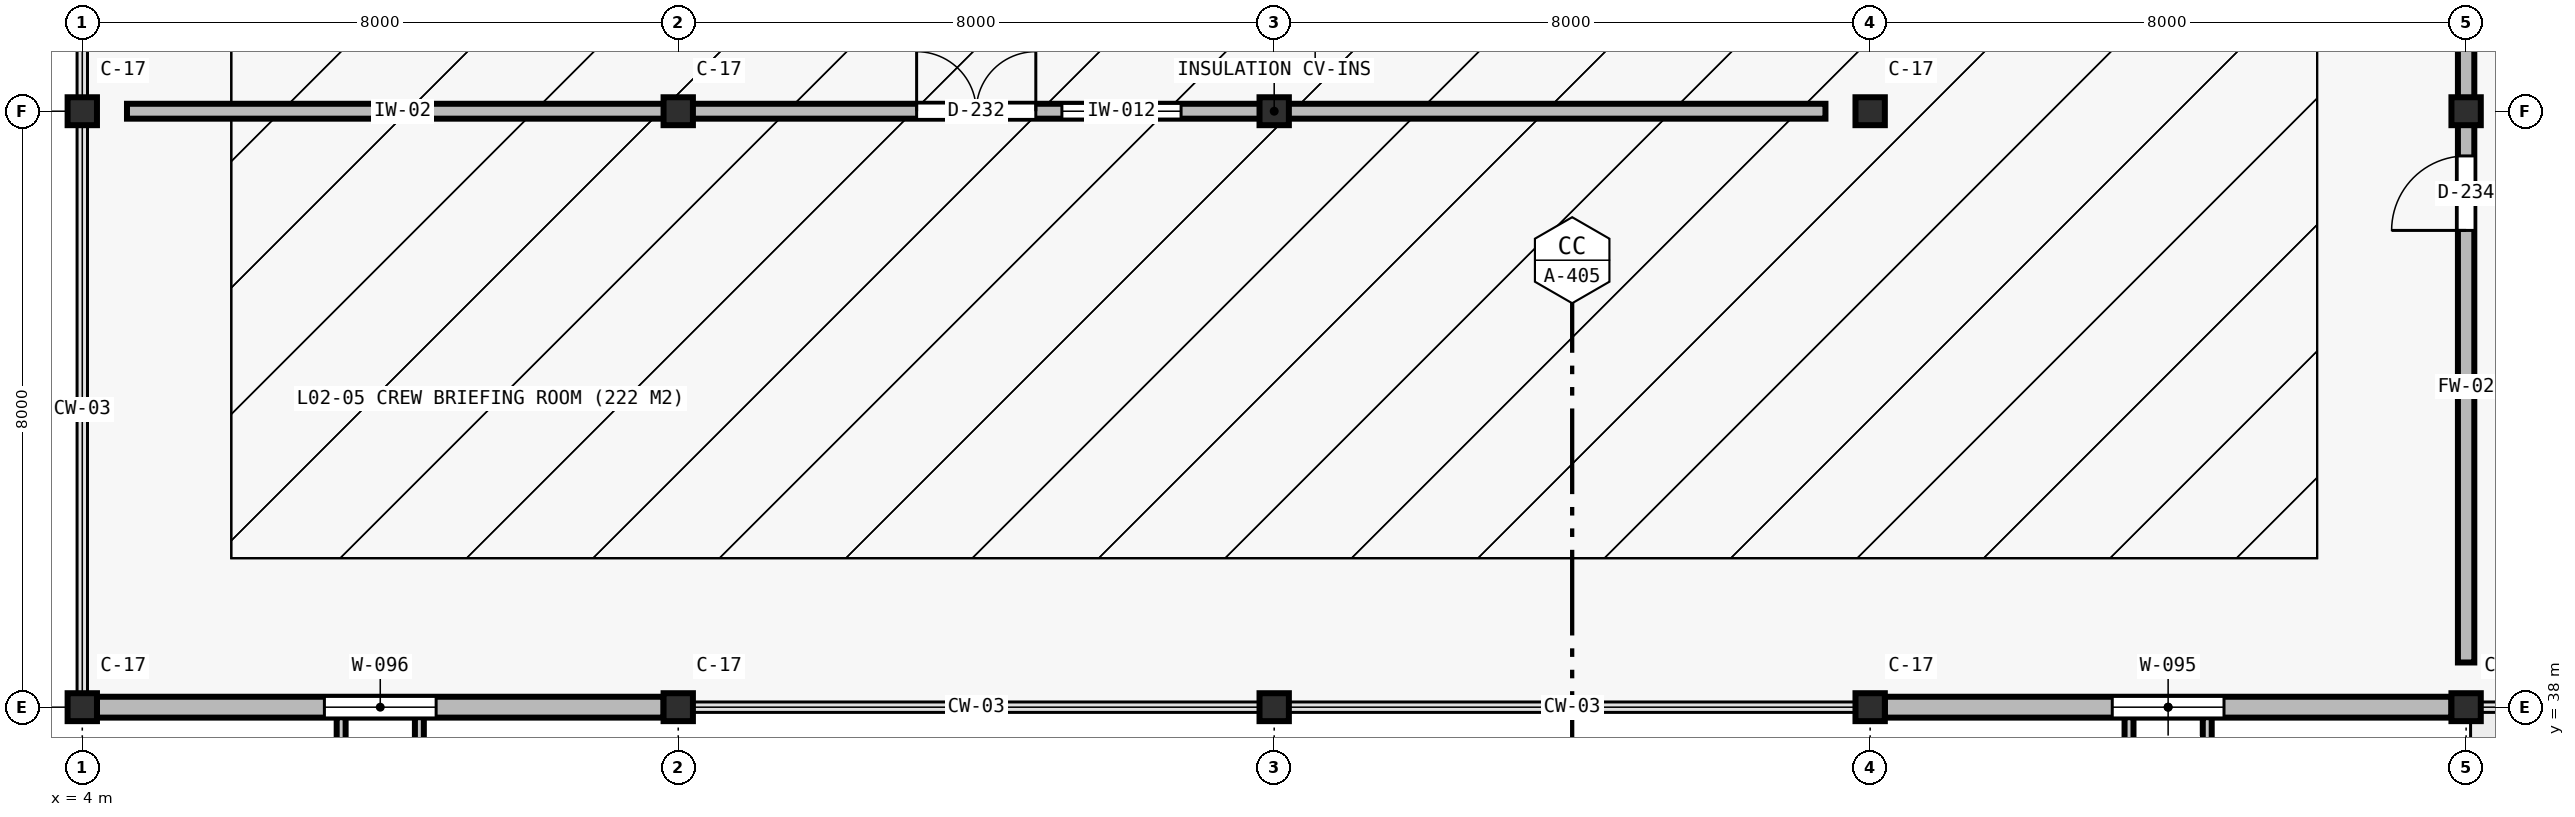
"""IFC4 building model, lengths in metres.
Left out: names, types, materials, properties, quantities, classifications, styles, units other than length and angle.
Written with IfcOpenShell. Run it as: python <this file> out.ifc"""

import sys

from ifc_helpers import new_model, si_unit, direction, frame, frame_2d, origin, origin_2d, place, context, subcontext, project, spatial, rectangle, i_section, extrude, element, fill, save


model = new_model("IFC4")
c1 = context("Model", 3, precision=1e-05, world=origin(), true_north=direction((0.0, 1.0)))
c2 = subcontext(c1, "Body", "Model", "MODEL_VIEW")
j1 = project(units=[si_unit("LENGTHUNIT", "METRE"), si_unit("PLANEANGLEUNIT", "RADIAN")], contexts=[c1])
p1 = place(None, origin())
s1 = spatial("IfcSite", under=j1, at=p1, CompositionType="ELEMENT")
p2 = place(p1, origin())
s2 = spatial("IfcBuilding", under=s1, at=p2, CompositionType="ELEMENT")
p3 = place(p2, frame((0.0, 0.0, 11.2)))
s3 = spatial("IfcBuildingStorey", under=s2, at=p3, CompositionType="ELEMENT", Elevation=11.2)
for number, where, z_axis, x_axis in (
    (1, (4.0, 38.0, 0.0), (0.0, 0.0, 1.0), (1.0, 0.0, 0.0)),
    (2, (4.0, 46.0, 0.0), (0.0, 0.0, 1.0), (1.0, 0.0, 0.0)),
    (3, (12.0, 38.0, 0.0), (0.0, 0.0, 1.0), (1.0, 0.0, 0.0)),
    (4, (12.0, 46.0, 0.0), (0.0, 0.0, 1.0), (1.0, 0.0, 0.0)),
    (5, (20.0, 38.0, 0.0), (0.0, 0.0, 1.0), (1.0, 0.0, 0.0)),
    (6, (20.0, 46.0, 0.0), (0.0, 0.0, 1.0), (1.0, 0.0, 0.0)),
    (7, (28.0, 38.0, 0.0), (0.0, 0.0, 1.0), (1.0, 0.0, 0.0)),
    (8, (28.0, 46.0, 0.0), (0.0, 0.0, 1.0), (1.0, 0.0, 0.0)),
    (9, (36.0, 38.0, 0.0), (0.0, 0.0, 1.0), (1.0, 0.0, 0.0)),
    (10, (36.0, 46.0, 0.0), (0.0, 0.0, 1.0), (1.0, 0.0, 0.0)),
):
    element("IfcColumn", number, at=place(p3, frame(where, z_axis=z_axis, x_axis=x_axis)), inside=s3, PredefinedType="COLUMN", context=c2, shape_type="SweptSolid", body=[
        extrude(i_section(OverallWidth=0.394, OverallDepth=0.375, WebThickness=0.017, FlangeThickness=0.028, at=origin_2d()), origin(), (0.0, 0.0, 1.0), 4.0),
    ])
p4 = place(p3, frame((35.803, 38.0, 0.0), z_axis=(0.0, 0.0, 1.0), x_axis=(-1.0, 0.0, 0.0)))
e11 = element("IfcWall", 11, at=p4, inside=s3, PredefinedType="STANDARD", context=c2, shape_type="SweptSolid", body=[
    extrude(rectangle(XDim=7.606, YDim=0.28, at=frame_2d((3.803, 0.0))), origin(), (0.0, 0.0, 1.0), 3.25),
])
p5 = place(p4, frame((3.053, 0.0, 0.95)))
e12 = element("IfcOpeningElement", 12, at=p5, cuts=e11, PredefinedType="OPENING", context=c2, shape_type="SweptSolid", body=[
    extrude(rectangle(XDim=1.5, YDim=2.0, at=frame_2d((0.75, 1.0))), frame((0.0, 0.15, 0.0), z_axis=(0.0, -1.0, 0.0), x_axis=(1.0, 0.0, 0.0)), (0.0, 0.0, 1.0), 0.3),
])
p6 = place(p3, frame((11.803, 38.0, 0.0), z_axis=(0.0, 0.0, 1.0), x_axis=(-1.0, 0.0, 0.0)))
e13 = element("IfcWall", 13, at=p6, inside=s3, PredefinedType="STANDARD", context=c2, shape_type="SweptSolid", body=[
    extrude(rectangle(XDim=7.606, YDim=0.28, at=frame_2d((3.803, 0.0))), origin(), (0.0, 0.0, 1.0), 3.25),
])
p7 = place(p6, frame((3.053, 0.0, 0.95)))
e14 = element("IfcOpeningElement", 14, at=p7, cuts=e13, PredefinedType="OPENING", context=c2, shape_type="SweptSolid", body=[
    extrude(rectangle(XDim=1.5, YDim=2.0, at=frame_2d((0.75, 1.0))), frame((0.0, 0.15, 0.0), z_axis=(0.0, -1.0, 0.0), x_axis=(1.0, 0.0, 0.0)), (0.0, 0.0, 1.0), 0.3),
])
p8 = place(p3, frame((4.6, 46.0, 0.0), z_axis=(0.0, 0.0, 1.0), x_axis=(1.0, 0.0, 0.0)))
e15 = element("IfcWall", 15, at=p8, inside=s3, PredefinedType="PARTITIONING", context=c2, shape_type="SweptSolid", body=[
    extrude(rectangle(XDim=7.4, YDim=0.2, at=frame_2d((3.7, 0.0))), origin(), (0.0, 0.0, 1.0), 3.25),
])
p9 = place(p3, frame((36.0, 38.6, 0.0), z_axis=(0.0, 0.0, 1.0), x_axis=(0.0, 1.0, 0.0)))
e16 = element("IfcWall", 16, at=p9, inside=s3, PredefinedType="SOLIDWALL", context=c2, shape_type="SweptSolid", body=[
    extrude(rectangle(XDim=7.4, YDim=0.22, at=frame_2d((3.7, 0.0))), origin(), (0.0, 0.0, 1.0), 3.25),
])
p10 = place(p9, frame((5.8, 0.0, 0.0)))
e17 = element("IfcOpeningElement", 17, at=p10, cuts=e16, PredefinedType="OPENING", context=c2, shape_type="SweptSolid", body=[
    extrude(rectangle(XDim=1.0, YDim=2.15, at=frame_2d((0.5, 1.075))), frame((0.0, 0.12, 0.0), z_axis=(0.0, -1.0, 0.0), x_axis=(1.0, 0.0, 0.0)), (0.0, 0.0, 1.0), 0.24),
])
p11 = place(p3, frame((12.0, 46.0, 0.0), z_axis=(0.0, 0.0, 1.0), x_axis=(1.0, 0.0, 0.0)))
e18 = element("IfcWall", 18, at=p11, inside=s3, PredefinedType="PARTITIONING", context=c2, shape_type="SweptSolid", body=[
    extrude(rectangle(XDim=15.4, YDim=0.2, at=frame_2d((7.7, 0.0))), origin(), (0.0, 0.0, 1.0), 3.456),
])
p12 = place(p11, frame((3.2, 0.0, 0.0)))
e19 = element("IfcOpeningElement", 19, at=p12, cuts=e18, PredefinedType="OPENING", context=c2, shape_type="SweptSolid", body=[
    extrude(rectangle(XDim=1.6, YDim=2.2, at=frame_2d((0.8, 1.1))), frame((0.0, 0.11, 0.0), z_axis=(0.0, -1.0, 0.0), x_axis=(1.0, 0.0, 0.0)), (0.0, 0.0, 1.0), 0.22),
])
p13 = place(p11, frame((5.15, 0.0, 0.95)))
e20 = element("IfcOpeningElement", 20, at=p13, cuts=e18, PredefinedType="OPENING", context=c2, shape_type="SweptSolid", body=[
    extrude(rectangle(XDim=1.6, YDim=1.3, at=frame_2d((0.8, 0.65))), frame((0.0, 0.11, 0.0), z_axis=(0.0, -1.0, 0.0), x_axis=(1.0, 0.0, 0.0)), (0.0, 0.0, 1.0), 0.22),
])
p14 = place(p3, frame((36.0, 46.0, 0.0), z_axis=(0.0, 0.0, 1.0), x_axis=(0.0, 1.0, 0.0)))
e21 = element("IfcWall", 21, at=p14, inside=s3, PredefinedType="SOLIDWALL", context=c2, shape_type="SweptSolid", body=[
    extrude(rectangle(XDim=7.4, YDim=0.22, at=frame_2d((3.7, 0.0))), origin(), (0.0, 0.0, 1.0), 3.461),
])
p15 = place(p5, origin())
e22 = element("IfcWindow", 22, at=p15, inside=s3, PartitioningType="SINGLE_PANEL", PredefinedType="WINDOW", context=c2, shape_type="SweptSolid", body=[
    extrude(rectangle(XDim=1.5, YDim=2.0, at=frame_2d((0.75, 1.0))), frame((0.0, 0.03, 0.0), z_axis=(0.0, -1.0, 0.0), x_axis=(1.0, 0.0, 0.0)), (0.0, 0.0, 1.0), 0.06),
])
fill(e12, e22)
p16 = place(p7, origin())
e23 = element("IfcWindow", 23, at=p16, inside=s3, PartitioningType="SINGLE_PANEL", PredefinedType="WINDOW", context=c2, shape_type="SweptSolid", body=[
    extrude(rectangle(XDim=1.5, YDim=2.0, at=frame_2d((0.75, 1.0))), frame((0.0, 0.03, 0.0), z_axis=(0.0, -1.0, 0.0), x_axis=(1.0, 0.0, 0.0)), (0.0, 0.0, 1.0), 0.06),
])
fill(e14, e23)
p17 = place(p12, origin())
e24 = element("IfcDoor", 24, at=p17, inside=s3, OperationType="DOUBLE_DOOR_SINGLE_SWING", PredefinedType="DOOR", context=c2, shape_type="SweptSolid", body=[
    extrude(rectangle(XDim=1.6, YDim=2.2, at=frame_2d((0.8, 1.1))), frame((0.0, 0.025, 0.0), z_axis=(0.0, -1.0, 0.0), x_axis=(1.0, 0.0, 0.0)), (0.0, 0.0, 1.0), 0.05),
])
fill(e19, e24)
p18 = place(p13, origin())
e25 = element("IfcWindow", 25, at=p18, inside=s3, PartitioningType="SINGLE_PANEL", PredefinedType="WINDOW", context=c2, shape_type="SweptSolid", body=[
    extrude(rectangle(XDim=1.6, YDim=1.3, at=frame_2d((0.8, 0.65))), frame((0.0, 0.03, 0.0), z_axis=(0.0, -1.0, 0.0), x_axis=(1.0, 0.0, 0.0)), (0.0, 0.0, 1.0), 0.06),
])
fill(e20, e25)
p19 = place(p10, origin())
e26 = element("IfcDoor", 26, at=p19, inside=s3, OperationType="SINGLE_SWING_LEFT", PredefinedType="DOOR", context=c2, shape_type="SweptSolid", body=[
    extrude(rectangle(XDim=1.0, YDim=2.15, at=frame_2d((0.5, 1.075))), frame((0.0, 0.025, 0.0), z_axis=(0.0, -1.0, 0.0), x_axis=(1.0, 0.0, 0.0)), (0.0, 0.0, 1.0), 0.05),
])
fill(e17, e26)
save(model, sys.argv[1])
